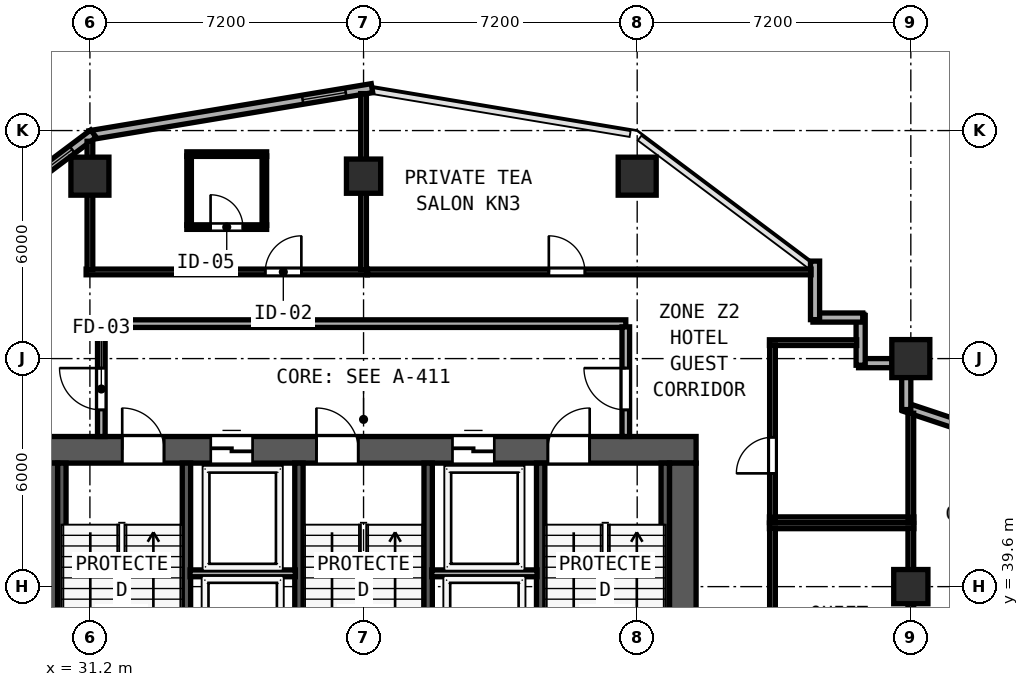
"""IFC4 building model, lengths in metres.
Left out: names, types, materials, properties, quantities, classifications, styles, units other than length and angle.
Written with IfcOpenShell. Run it as: python <this file> out.ifc"""

import sys

from ifc_helpers import new_model, si_unit, direction, frame, frame_2d, origin, origin_2d, place, context, subcontext, project, spatial, rectangle, hollow_rectangle, extrude, element, fill, save


model = new_model("IFC4")
c1 = context("Model", 3, precision=1e-05, world=origin(), true_north=direction((0.0, 1.0)))
c2 = subcontext(c1, "Body", "Model", "MODEL_VIEW")
j1 = project(units=[si_unit("LENGTHUNIT", "METRE"), si_unit("PLANEANGLEUNIT", "RADIAN")], contexts=[c1])
p1 = place(None, origin())
s1 = spatial("IfcSite", under=j1, at=p1, CompositionType="ELEMENT")
p2 = place(p1, origin())
s2 = spatial("IfcBuilding", under=s1, at=p2, CompositionType="ELEMENT")
p3 = place(p2, frame((0.0, 0.0, 152.4)))
s3 = spatial("IfcBuildingStorey", under=s2, at=p3, CompositionType="ELEMENT", Elevation=152.4)
p4 = place(p3, frame((29.65, 43.2, 0.0), z_axis=(0.0, 0.0, 1.0), x_axis=(1.0, 0.0, 0.0)))
e1 = element("IfcWall", 1, at=p4, inside=s3, PredefinedType="SHEAR", context=c2, shape_type="SweptSolid", body=[
    extrude(rectangle(XDim=17.5, YDim=0.7, at=frame_2d((8.75, 0.0))), origin(), (0.0, 0.0, 1.0), 3.6),
])
p5 = place(p4, frame((2.4, 0.0, 0.0)))
e2 = element("IfcOpeningElement", 2, at=p5, cuts=e1, PredefinedType="OPENING", context=c2, shape_type="SweptSolid", body=[
    extrude(rectangle(XDim=1.1, YDim=2.15, at=frame_2d((0.55, 1.075))), frame((0.0, 0.36, 0.0), z_axis=(0.0, -1.0, 0.0), x_axis=(1.0, 0.0, 0.0)), (0.0, 0.0, 1.0), 0.72),
])
p6 = place(p4, frame((7.51, 0.0, 0.0)))
e3 = element("IfcOpeningElement", 3, at=p6, cuts=e1, PredefinedType="OPENING", context=c2, shape_type="SweptSolid", body=[
    extrude(rectangle(XDim=1.1, YDim=2.15, at=frame_2d((0.55, 1.075))), frame((0.0, 0.36, 0.0), z_axis=(0.0, -1.0, 0.0), x_axis=(1.0, 0.0, 0.0)), (0.0, 0.0, 1.0), 0.72),
])
p7 = place(p4, frame((13.6, 0.0, 0.0)))
e4 = element("IfcOpeningElement", 4, at=p7, cuts=e1, PredefinedType="OPENING", context=c2, shape_type="SweptSolid", body=[
    extrude(rectangle(XDim=1.1, YDim=2.15, at=frame_2d((0.55, 1.075))), frame((0.0, 0.36, 0.0), z_axis=(0.0, -1.0, 0.0), x_axis=(1.0, 0.0, 0.0)), (0.0, 0.0, 1.0), 0.72),
])
p8 = place(p4, frame((4.73, 0.0, 0.0)))
e5 = element("IfcOpeningElement", 5, at=p8, cuts=e1, PredefinedType="OPENING", context=c2, shape_type="SweptSolid", body=[
    extrude(rectangle(XDim=1.1, YDim=2.2, at=frame_2d((0.55, 1.1))), frame((0.0, 0.36, 0.0), z_axis=(0.0, -1.0, 0.0), x_axis=(1.0, 0.0, 0.0)), (0.0, 0.0, 1.0), 0.72),
])
p9 = place(p4, frame((11.09, 0.0, 0.0)))
e6 = element("IfcOpeningElement", 6, at=p9, cuts=e1, PredefinedType="OPENING", context=c2, shape_type="SweptSolid", body=[
    extrude(rectangle(XDim=1.1, YDim=2.2, at=frame_2d((0.55, 1.1))), frame((0.0, 0.36, 0.0), z_axis=(0.0, -1.0, 0.0), x_axis=(1.0, 0.0, 0.0)), (0.0, 0.0, 1.0), 0.72),
])
for number, where, z_axis, x_axis in (
    (7, (30.0, 32.8, 0.0), (0.0, 0.0, 1.0), (0.0, 1.0, 0.0)),
    (8, (46.8, 32.8, 0.0), (0.0, 0.0, 1.0), (0.0, 1.0, 0.0)),
):
    element("IfcWall", number, at=place(p3, frame(where, z_axis=z_axis, x_axis=x_axis)), inside=s3, PredefinedType="SHEAR", context=c2, shape_type="SweptSolid", body=[
        extrude(rectangle(XDim=10.05, YDim=0.7, at=frame_2d((5.025, 0.0))), origin(), (0.0, 0.0, 1.0), 3.6),
    ])
for number, where, z_axis, x_axis in (
    (9, (30.462, 35.39, 0.0), (0.0, 0.0, 1.0), (0.0, 1.0, 0.0)),
    (10, (33.74, 35.39, 0.0), (0.0, 0.0, 1.0), (0.0, 1.0, 0.0)),
    (11, (36.7, 35.39, 0.0), (0.0, 0.0, 1.0), (0.0, 1.0, 0.0)),
    (12, (40.1, 35.39, 0.0), (0.0, 0.0, 1.0), (0.0, 1.0, 0.0)),
    (13, (43.06, 35.39, 0.0), (0.0, 0.0, 1.0), (0.0, 1.0, 0.0)),
    (14, (46.338, 35.39, 0.0), (0.0, 0.0, 1.0), (0.0, 1.0, 0.0)),
):
    element("IfcWall", number, at=place(p3, frame(where, z_axis=z_axis, x_axis=x_axis)), inside=s3, PredefinedType="SHEAR", context=c2, shape_type="SweptSolid", body=[
        extrude(rectangle(XDim=7.46, YDim=0.22, at=frame_2d((3.73, 0.0))), origin(), (0.0, 0.0, 1.0), 3.6),
    ])
for number, where, z_axis, x_axis in (
    (15, (52.8, 45.6, 0.0), (0.0, 0.0, 1.0), (1.0, 0.0, 0.0)),
    (16, (31.2, 50.4, 0.0), (0.0, 0.0, 1.0), (1.0, 0.0, 0.0)),
    (17, (45.6, 50.4, 0.0), (0.0, 0.0, 1.0), (1.0, 0.0, 0.0)),
):
    element("IfcColumn", number, at=place(p3, frame(where, z_axis=z_axis, x_axis=x_axis)), inside=s3, PredefinedType="COLUMN", context=c2, shape_type="SweptSolid", body=[
        extrude(hollow_rectangle(XDim=1.0, YDim=1.0, WallThickness=0.038, at=origin_2d()), origin(), (0.0, 0.0, 1.0), 3.8),
    ])
for number, where, z_axis, x_axis in (
    (18, (52.8, 39.6, 0.0), (0.0, 0.0, 1.0), (1.0, 0.0, 0.0)),
    (19, (38.4, 50.4, 0.0), (0.0, 0.0, 1.0), (1.0, 0.0, 0.0)),
):
    element("IfcColumn", number, at=place(p3, frame(where, z_axis=z_axis, x_axis=x_axis)), inside=s3, PredefinedType="COLUMN", context=c2, shape_type="SweptSolid", body=[
        extrude(hollow_rectangle(XDim=0.9, YDim=0.9, WallThickness=0.034, at=origin_2d()), origin(), (0.0, 0.0, 1.0), 3.8),
    ])
p10 = place(p3, frame((58.295, 42.442, 0.0), z_axis=(0.0, 0.0, 1.0), x_axis=(-0.948687385027, 0.316215504823, 0.0)))
e20 = element("IfcWall", 20, at=p10, inside=s3, PredefinedType="SOLIDWALL", context=c2, shape_type="SweptSolid", body=[
    extrude(rectangle(XDim=5.973, YDim=0.24, at=frame_2d((2.987, 0.0))), origin(), (0.0, 0.0, 1.0), 3.145),
])
p11 = place(p10, frame((1.67, 0.0, 0.85)))
e21 = element("IfcOpeningElement", 21, at=p11, cuts=e20, PredefinedType="OPENING", context=c2, shape_type="SweptSolid", body=[
    extrude(rectangle(XDim=1.15, YDim=1.8, at=frame_2d((0.575, 0.9))), frame((0.0, 0.13, 0.0), z_axis=(0.0, -1.0, 0.0), x_axis=(1.0, 0.0, 0.0)), (0.0, 0.0, 1.0), 0.26),
])
p12 = place(p3, frame((52.68, 44.259, 0.0), z_axis=(0.0, 0.0, 1.0), x_axis=(0.0, 1.0, 0.0)))
e22 = element("IfcWall", 22, at=p12, inside=s3, PredefinedType="SOLIDWALL", context=c2, shape_type="SweptSolid", body=[
    extrude(rectangle(XDim=0.849, YDim=0.24, at=frame_2d((0.425, 0.0))), origin(), (0.0, 0.0, 1.0), 3.145),
])
p13 = place(p3, frame((52.308, 45.48, 0.0), z_axis=(0.0, 0.0, 1.0), x_axis=(-1.0, 0.0, 0.0)))
e23 = element("IfcWall", 23, at=p13, inside=s3, PredefinedType="SOLIDWALL", context=c2, shape_type="SweptSolid", body=[
    extrude(rectangle(XDim=0.883, YDim=0.24, at=frame_2d((0.441, 0.0))), origin(), (0.0, 0.0, 1.0), 3.6),
])
p14 = place(p3, frame((51.48, 45.425, 0.0), z_axis=(0.0, 0.0, 1.0), x_axis=(0.0, 1.0, 0.0)))
e24 = element("IfcWall", 24, at=p14, inside=s3, PredefinedType="SOLIDWALL", context=c2, shape_type="SweptSolid", body=[
    extrude(rectangle(XDim=1.31, YDim=0.24, at=frame_2d((0.655, 0.0))), origin(), (0.0, 0.0, 1.0), 3.6),
])
p15 = place(p3, frame((51.535, 46.68, 0.0), z_axis=(0.0, 0.0, 1.0), x_axis=(-1.0, 0.0, 0.0)))
e25 = element("IfcWall", 25, at=p15, inside=s3, PredefinedType="SOLIDWALL", context=c2, shape_type="SweptSolid", body=[
    extrude(rectangle(XDim=1.31, YDim=0.24, at=frame_2d((0.655, 0.0))), origin(), (0.0, 0.0, 1.0), 3.6),
])
p16 = place(p3, frame((50.28, 46.625, 0.0), z_axis=(0.0, 0.0, 1.0), x_axis=(0.0, 1.0, 0.0)))
e26 = element("IfcWall", 26, at=p16, inside=s3, PredefinedType="SOLIDWALL", context=c2, shape_type="SweptSolid", body=[
    extrude(rectangle(XDim=1.54, YDim=0.24, at=frame_2d((0.77, 0.0))), origin(), (0.0, 0.0, 1.0), 3.6),
])
p17 = place(p3, frame((38.622, 52.715, 0.0), z_axis=(0.0, 0.0, 1.0), x_axis=(-0.98639129485, -0.164414760418, 0.0)))
e27 = element("IfcWall", 27, at=p17, inside=s3, PredefinedType="SOLIDWALL", context=c2, shape_type="SweptSolid", body=[
    extrude(rectangle(XDim=7.53, YDim=0.24, at=frame_2d((3.765, 0.0))), origin(), (0.0, 0.0, 1.0), 3.6),
])
p18 = place(p17, frame((0.7, 0.0, 0.85)))
e28 = element("IfcOpeningElement", 28, at=p18, cuts=e27, PredefinedType="OPENING", context=c2, shape_type="SweptSolid", body=[
    extrude(rectangle(XDim=1.15, YDim=1.8, at=frame_2d((0.575, 0.9))), frame((0.0, 0.13, 0.0), z_axis=(0.0, -1.0, 0.0), x_axis=(1.0, 0.0, 0.0)), (0.0, 0.0, 1.0), 0.26),
])
p19 = place(p3, frame((31.292, 51.519, 0.0), z_axis=(0.0, 0.0, 1.0), x_axis=(-0.8, -0.6, 0.0)))
e29 = element("IfcWall", 29, at=p19, inside=s3, PredefinedType="SOLIDWALL", context=c2, shape_type="SweptSolid", body=[
    extrude(rectangle(XDim=6.021, YDim=0.24, at=frame_2d((3.01, 0.0))), origin(), (0.0, 0.0, 1.0), 3.6),
])
p20 = place(p19, frame((0.7, 0.0, 0.85)))
e30 = element("IfcOpeningElement", 30, at=p20, cuts=e29, PredefinedType="OPENING", context=c2, shape_type="SweptSolid", body=[
    extrude(rectangle(XDim=1.15, YDim=1.8, at=frame_2d((0.575, 0.9))), frame((0.0, 0.13, 0.0), z_axis=(0.0, -1.0, 0.0), x_axis=(1.0, 0.0, 0.0)), (0.0, 0.0, 1.0), 0.26),
])
p21 = place(p3, frame((31.5, 46.52, 0.0), z_axis=(0.0, 0.0, 1.0), x_axis=(1.0, 0.0, 0.0)))
e31 = element("IfcWall", 31, at=p21, inside=s3, PredefinedType="SOLIDWALL", context=c2, shape_type="SweptSolid", body=[
    extrude(rectangle(XDim=13.8, YDim=0.2, at=frame_2d((6.9, 0.0))), origin(), (0.0, 0.0, 1.0), 3.6),
])
p22 = place(p3, frame((31.5, 43.55, 0.0), z_axis=(0.0, 0.0, 1.0), x_axis=(0.0, 1.0, 0.0)))
e32 = element("IfcWall", 32, at=p22, inside=s3, PredefinedType="SOLIDWALL", context=c2, shape_type="SweptSolid", body=[
    extrude(rectangle(XDim=2.885, YDim=0.2, at=frame_2d((1.442, 0.0))), origin(), (0.0, 0.0, 1.0), 3.6),
])
p23 = place(p22, frame((1.8, 0.0, 0.0), z_axis=(0.0, 0.0, 1.0), x_axis=(-1.0, 0.0, 0.0)))
e33 = element("IfcOpeningElement", 33, at=p23, cuts=e32, PredefinedType="OPENING", context=c2, shape_type="SweptSolid", body=[
    extrude(rectangle(XDim=1.1, YDim=2.15, at=frame_2d((0.55, 1.075))), frame((0.0, 0.11, 0.0), z_axis=(0.0, -1.0, 0.0), x_axis=(1.0, 0.0, 0.0)), (0.0, 0.0, 1.0), 0.22),
])
p24 = place(p3, frame((45.3, 43.55, 0.0), z_axis=(0.0, 0.0, 1.0), x_axis=(0.0, 1.0, 0.0)))
e34 = element("IfcWall", 34, at=p24, inside=s3, PredefinedType="SOLIDWALL", context=c2, shape_type="SweptSolid", body=[
    extrude(rectangle(XDim=2.885, YDim=0.2, at=frame_2d((1.442, 0.0))), origin(), (0.0, 0.0, 1.0), 3.6),
])
p25 = place(p24, frame((0.7, 0.0, 0.0)))
e35 = element("IfcOpeningElement", 35, at=p25, cuts=e34, PredefinedType="OPENING", context=c2, shape_type="SweptSolid", body=[
    extrude(rectangle(XDim=1.1, YDim=2.15, at=frame_2d((0.55, 1.075))), frame((0.0, 0.11, 0.0), z_axis=(0.0, -1.0, 0.0), x_axis=(1.0, 0.0, 0.0)), (0.0, 0.0, 1.0), 0.22),
])
for number, where, z_axis, x_axis in (
    (36, (33.835, 39.95, 0.0), (0.0, 0.0, 1.0), (1.0, 0.0, 0.0)),
    (37, (40.195, 39.95, 0.0), (0.0, 0.0, 1.0), (1.0, 0.0, 0.0)),
):
    element("IfcWall", number, at=place(p3, frame(where, z_axis=z_axis, x_axis=x_axis)), inside=s3, PredefinedType="SOLIDWALL", context=c2, shape_type="SweptSolid", body=[
        extrude(rectangle(XDim=2.77, YDim=0.18, at=frame_2d((1.385, 0.0))), origin(), (0.0, 0.0, 1.0), 3.6),
    ])
p26 = place(p3, frame((49.08, 41.2, 0.0), z_axis=(0.0, 0.0, 1.0), x_axis=(1.0, 0.0, 0.0)))
e38 = element("IfcWall", 38, at=p26, inside=s3, PredefinedType="PARTITIONING", context=c2, shape_type="SweptSolid", body=[
    extrude(rectangle(XDim=3.8, YDim=0.15, at=frame_2d((1.9, 0.0))), origin(), (0.0, 0.0, 1.0), 3.6),
])
p27 = place(p3, frame((49.16, 36.52, 0.0), z_axis=(0.0, 0.0, 1.0), x_axis=(0.0, 1.0, 0.0)))
e39 = element("IfcWall", 39, at=p27, inside=s3, PredefinedType="PARTITIONING", context=c2, shape_type="SweptSolid", body=[
    extrude(rectangle(XDim=4.62, YDim=0.15, at=frame_2d((2.31, 0.0))), origin(), (0.0, 0.0, 1.0), 3.6),
])
p28 = place(p27, frame((1.36, 0.0, 0.0)))
e40 = element("IfcOpeningElement", 40, at=p28, cuts=e39, PredefinedType="OPENING", context=c2, shape_type="SweptSolid", body=[
    extrude(rectangle(XDim=0.95, YDim=2.12, at=frame_2d((0.475, 1.06))), frame((0.0, 0.085, 0.0), z_axis=(0.0, -1.0, 0.0), x_axis=(1.0, 0.0, 0.0)), (0.0, 0.0, 1.0), 0.17),
])
p29 = place(p3, frame((52.8, 36.52, 0.0), z_axis=(0.0, 0.0, 1.0), x_axis=(0.0, 1.0, 0.0)))
e41 = element("IfcWall", 41, at=p29, inside=s3, PredefinedType="PARTITIONING", context=c2, shape_type="SweptSolid", body=[
    extrude(rectangle(XDim=4.62, YDim=0.15, at=frame_2d((2.31, 0.0))), origin(), (0.0, 0.0, 1.0), 3.145),
])
p30 = place(p3, frame((49.08, 46.02, 0.0), z_axis=(0.0, 0.0, 1.0), x_axis=(1.0, 0.0, 0.0)))
e42 = element("IfcWall", 42, at=p30, inside=s3, PredefinedType="PARTITIONING", context=c2, shape_type="SweptSolid", body=[
    extrude(rectangle(XDim=2.295, YDim=0.15, at=frame_2d((1.147, 0.0))), origin(), (0.0, 0.0, 1.0), 3.6),
])
p31 = place(p3, frame((49.08, 41.36, 0.0), z_axis=(0.0, 0.0, 1.0), x_axis=(1.0, 0.0, 0.0)))
e43 = element("IfcWall", 43, at=p31, inside=s3, PredefinedType="PARTITIONING", context=c2, shape_type="SweptSolid", body=[
    extrude(rectangle(XDim=3.8, YDim=0.15, at=frame_2d((1.9, 0.0))), origin(), (0.0, 0.0, 1.0), 3.6),
])
p32 = place(p3, frame((49.16, 41.42, 0.0), z_axis=(0.0, 0.0, 1.0), x_axis=(0.0, 1.0, 0.0)))
e44 = element("IfcWall", 44, at=p32, inside=s3, PredefinedType="PARTITIONING", context=c2, shape_type="SweptSolid", body=[
    extrude(rectangle(XDim=4.54, YDim=0.15, at=frame_2d((2.27, 0.0))), origin(), (0.0, 0.0, 1.0), 3.6),
])
p33 = place(p32, frame((1.16, 0.0, 0.0)))
e45 = element("IfcOpeningElement", 45, at=p33, cuts=e44, PredefinedType="OPENING", context=c2, shape_type="SweptSolid", body=[
    extrude(rectangle(XDim=0.95, YDim=2.12, at=frame_2d((0.475, 1.06))), frame((0.0, 0.085, 0.0), z_axis=(0.0, -1.0, 0.0), x_axis=(1.0, 0.0, 0.0)), (0.0, 0.0, 1.0), 0.17),
])
p34 = place(p3, frame((52.8, 41.42, 0.0), z_axis=(0.0, 0.0, 1.0), x_axis=(0.0, 1.0, 0.0)))
e46 = element("IfcWall", 46, at=p34, inside=s3, PredefinedType="PARTITIONING", context=c2, shape_type="SweptSolid", body=[
    extrude(rectangle(XDim=2.743, YDim=0.15, at=frame_2d((1.372, 0.0))), origin(), (0.0, 0.0, 1.0), 3.145),
])
p35 = place(p3, frame((31.1, 47.88, 0.0), z_axis=(0.0, 0.0, 1.0), x_axis=(1.0, 0.0, 0.0)))
e47 = element("IfcWall", 47, at=p35, inside=s3, PredefinedType="PARTITIONING", context=c2, shape_type="SweptSolid", body=[
    extrude(rectangle(XDim=7.4, YDim=0.15, at=frame_2d((3.7, 0.0))), origin(), (0.0, 0.0, 1.0), 3.6),
])
p36 = place(p35, frame((4.714, 0.0, 0.0)))
e48 = element("IfcOpeningElement", 48, at=p36, cuts=e47, PredefinedType="OPENING", context=c2, shape_type="SweptSolid", body=[
    extrude(rectangle(XDim=0.95, YDim=2.15, at=frame_2d((0.475, 1.075))), frame((0.0, 0.085, 0.0), z_axis=(0.0, -1.0, 0.0), x_axis=(1.0, 0.0, 0.0)), (0.0, 0.0, 1.0), 0.17),
])
p37 = place(p3, frame((31.2, 47.94, 0.0), z_axis=(0.0, 0.0, 1.0), x_axis=(0.0, 1.0, 0.0)))
e49 = element("IfcWall", 49, at=p37, inside=s3, PredefinedType="PARTITIONING", context=c2, shape_type="SweptSolid", body=[
    extrude(rectangle(XDim=3.379, YDim=0.15, at=frame_2d((1.689, 0.0))), origin(), (0.0, 0.0, 1.0), 3.085),
])
p38 = place(p3, frame((38.4, 47.94, 0.0), z_axis=(0.0, 0.0, 1.0), x_axis=(0.0, 1.0, 0.0)))
e50 = element("IfcWall", 50, at=p38, inside=s3, PredefinedType="PARTITIONING", context=c2, shape_type="SweptSolid", body=[
    extrude(rectangle(XDim=4.632, YDim=0.15, at=frame_2d((2.316, 0.0))), origin(), (0.0, 0.0, 1.0), 3.6),
])
p39 = place(p3, frame((33.75, 50.98, 0.0), z_axis=(0.0, 0.0, 1.0), x_axis=(1.0, 0.0, 0.0)))
e51 = element("IfcWall", 51, at=p39, inside=s3, PredefinedType="PARTITIONING", context=c2, shape_type="SweptSolid", body=[
    extrude(rectangle(XDim=2.1, YDim=0.12, at=frame_2d((1.05, 0.0))), origin(), (0.0, 0.0, 1.0), 3.6),
])
p40 = place(p3, frame((33.75, 49.06, 0.0), z_axis=(0.0, 0.0, 1.0), x_axis=(1.0, 0.0, 0.0)))
e52 = element("IfcWall", 52, at=p40, inside=s3, PredefinedType="PARTITIONING", context=c2, shape_type="SweptSolid", body=[
    extrude(rectangle(XDim=2.1, YDim=0.12, at=frame_2d((1.05, 0.0))), origin(), (0.0, 0.0, 1.0), 3.6),
])
p41 = place(p40, frame((0.625, 0.0, 0.0)))
e53 = element("IfcOpeningElement", 53, at=p41, cuts=e52, PredefinedType="OPENING", context=c2, shape_type="SweptSolid", body=[
    extrude(rectangle(XDim=0.85, YDim=2.1, at=frame_2d((0.425, 1.05))), frame((0.0, 0.07, 0.0), z_axis=(0.0, -1.0, 0.0), x_axis=(1.0, 0.0, 0.0)), (0.0, 0.0, 1.0), 0.14),
])
for number, where, z_axis, x_axis in (
    (54, (33.81, 49.105, 0.0), (0.0, 0.0, 1.0), (0.0, 1.0, 0.0)),
    (55, (35.79, 49.105, 0.0), (0.0, 0.0, 1.0), (0.0, 1.0, 0.0)),
):
    element("IfcWall", number, at=place(p3, frame(where, z_axis=z_axis, x_axis=x_axis)), inside=s3, PredefinedType="PARTITIONING", context=c2, shape_type="SweptSolid", body=[
        extrude(rectangle(XDim=1.83, YDim=0.12, at=frame_2d((0.915, 0.0))), origin(), (0.0, 0.0, 1.0), 3.6),
    ])
p42 = place(p3, frame((38.502, 47.88, 0.0), z_axis=(0.0, 0.0, 1.0), x_axis=(1.0, 0.0, 0.0)))
e56 = element("IfcWall", 56, at=p42, inside=s3, PredefinedType="PARTITIONING", context=c2, shape_type="SweptSolid", body=[
    extrude(rectangle(XDim=11.673, YDim=0.15, at=frame_2d((5.836, 0.0))), origin(), (0.0, 0.0, 1.0), 3.6),
])
p43 = place(p42, frame((4.773, 0.0, 0.0)))
e57 = element("IfcOpeningElement", 57, at=p43, cuts=e56, PredefinedType="OPENING", context=c2, shape_type="SweptSolid", body=[
    extrude(rectangle(XDim=0.95, YDim=2.12, at=frame_2d((0.475, 1.06))), frame((0.0, 0.085, 0.0), z_axis=(0.0, -1.0, 0.0), x_axis=(1.0, 0.0, 0.0)), (0.0, 0.0, 1.0), 0.17),
])
p44 = place(p18, origin())
e58 = element("IfcWindow", 58, at=p44, inside=s3, PartitioningType="SINGLE_PANEL", PredefinedType="WINDOW", context=c2, shape_type="SweptSolid", body=[
    extrude(rectangle(XDim=1.15, YDim=1.8, at=frame_2d((0.575, 0.9))), frame((0.0, 0.03, 0.0), z_axis=(0.0, -1.0, 0.0), x_axis=(1.0, 0.0, 0.0)), (0.0, 0.0, 1.0), 0.06),
])
fill(e28, e58)
p45 = place(p20, origin())
e59 = element("IfcWindow", 59, at=p45, inside=s3, PartitioningType="SINGLE_PANEL", PredefinedType="WINDOW", context=c2, shape_type="SweptSolid", body=[
    extrude(rectangle(XDim=1.15, YDim=1.8, at=frame_2d((0.575, 0.9))), frame((0.0, 0.03, 0.0), z_axis=(0.0, -1.0, 0.0), x_axis=(1.0, 0.0, 0.0)), (0.0, 0.0, 1.0), 0.06),
])
fill(e30, e59)
p46 = place(p5, origin())
e60 = element("IfcDoor", 60, at=p46, inside=s3, OperationType="SINGLE_SWING_LEFT", PredefinedType="DOOR", context=c2, shape_type="SweptSolid", body=[
    extrude(rectangle(XDim=1.1, YDim=2.15, at=frame_2d((0.55, 1.075))), frame((0.0, 0.185, 0.0), z_axis=(0.0, -1.0, 0.0), x_axis=(1.0, 0.0, 0.0)), (0.0, 0.0, 1.0), 0.05),
])
fill(e2, e60)
p47 = place(p6, origin())
e61 = element("IfcDoor", 61, at=p47, inside=s3, OperationType="SINGLE_SWING_LEFT", PredefinedType="DOOR", context=c2, shape_type="SweptSolid", body=[
    extrude(rectangle(XDim=1.1, YDim=2.15, at=frame_2d((0.55, 1.075))), frame((0.0, 0.185, 0.0), z_axis=(0.0, -1.0, 0.0), x_axis=(1.0, 0.0, 0.0)), (0.0, 0.0, 1.0), 0.05),
])
fill(e3, e61)
p48 = place(p7, origin())
e62 = element("IfcDoor", 62, at=p48, inside=s3, OperationType="SINGLE_SWING_RIGHT", PredefinedType="DOOR", context=c2, shape_type="SweptSolid", body=[
    extrude(rectangle(XDim=1.1, YDim=2.15, at=frame_2d((0.55, 1.075))), frame((0.0, 0.185, 0.0), z_axis=(0.0, -1.0, 0.0), x_axis=(1.0, 0.0, 0.0)), (0.0, 0.0, 1.0), 0.05),
])
fill(e4, e62)
p49 = place(p23, origin())
e63 = element("IfcDoor", 63, at=p49, inside=s3, OperationType="SINGLE_SWING_LEFT", PredefinedType="DOOR", context=c2, shape_type="SweptSolid", body=[
    extrude(rectangle(XDim=1.1, YDim=2.15, at=frame_2d((0.55, 1.075))), frame((0.0, 0.025, 0.0), z_axis=(0.0, -1.0, 0.0), x_axis=(1.0, 0.0, 0.0)), (0.0, 0.0, 1.0), 0.05),
])
fill(e33, e63)
p50 = place(p25, origin())
e64 = element("IfcDoor", 64, at=p50, inside=s3, OperationType="SINGLE_SWING_RIGHT", PredefinedType="DOOR", context=c2, shape_type="SweptSolid", body=[
    extrude(rectangle(XDim=1.1, YDim=2.15, at=frame_2d((0.55, 1.075))), frame((0.0, 0.025, 0.0), z_axis=(0.0, -1.0, 0.0), x_axis=(1.0, 0.0, 0.0)), (0.0, 0.0, 1.0), 0.05),
])
fill(e35, e64)
p51 = place(p8, origin())
e65 = element("IfcDoor", 65, at=p51, inside=s3, OperationType="SLIDING_TO_LEFT", PredefinedType="DOOR", context=c2, shape_type="SweptSolid", body=[
    extrude(rectangle(XDim=1.1, YDim=2.2, at=frame_2d((0.55, 1.1))), frame((0.0, 0.185, 0.0), z_axis=(0.0, -1.0, 0.0), x_axis=(1.0, 0.0, 0.0)), (0.0, 0.0, 1.0), 0.05),
])
fill(e5, e65)
p52 = place(p9, origin())
e66 = element("IfcDoor", 66, at=p52, inside=s3, OperationType="SLIDING_TO_LEFT", PredefinedType="DOOR", context=c2, shape_type="SweptSolid", body=[
    extrude(rectangle(XDim=1.1, YDim=2.2, at=frame_2d((0.55, 1.1))), frame((0.0, 0.185, 0.0), z_axis=(0.0, -1.0, 0.0), x_axis=(1.0, 0.0, 0.0)), (0.0, 0.0, 1.0), 0.05),
])
fill(e6, e66)
p53 = place(p33, origin())
e67 = element("IfcDoor", 67, at=p53, inside=s3, OperationType="SINGLE_SWING_LEFT", PredefinedType="DOOR", context=c2, shape_type="SweptSolid", body=[
    extrude(rectangle(XDim=0.95, YDim=2.12, at=frame_2d((0.475, 1.06))), frame((0.0, 0.025, 0.0), z_axis=(0.0, -1.0, 0.0), x_axis=(1.0, 0.0, 0.0)), (0.0, 0.0, 1.0), 0.05),
])
fill(e45, e67)
p54 = place(p36, origin())
e68 = element("IfcDoor", 68, at=p54, inside=s3, OperationType="SINGLE_SWING_RIGHT", PredefinedType="DOOR", context=c2, shape_type="SweptSolid", body=[
    extrude(rectangle(XDim=0.95, YDim=2.15, at=frame_2d((0.475, 1.075))), frame((0.0, 0.025, 0.0), z_axis=(0.0, -1.0, 0.0), x_axis=(1.0, 0.0, 0.0)), (0.0, 0.0, 1.0), 0.05),
])
fill(e48, e68)
p55 = place(p41, origin())
e69 = element("IfcDoor", 69, at=p55, inside=s3, OperationType="SINGLE_SWING_LEFT", PredefinedType="DOOR", context=c2, shape_type="SweptSolid", body=[
    extrude(rectangle(XDim=0.85, YDim=2.1, at=frame_2d((0.425, 1.05))), frame((0.0, 0.025, 0.0), z_axis=(0.0, -1.0, 0.0), x_axis=(1.0, 0.0, 0.0)), (0.0, 0.0, 1.0), 0.05),
])
fill(e53, e69)
p56 = place(p43, origin())
e70 = element("IfcDoor", 70, at=p56, inside=s3, OperationType="SINGLE_SWING_LEFT", PredefinedType="DOOR", context=c2, shape_type="SweptSolid", body=[
    extrude(rectangle(XDim=0.95, YDim=2.12, at=frame_2d((0.475, 1.06))), frame((0.0, 0.025, 0.0), z_axis=(0.0, -1.0, 0.0), x_axis=(1.0, 0.0, 0.0)), (0.0, 0.0, 1.0), 0.05),
])
fill(e57, e70)
save(model, sys.argv[1])
